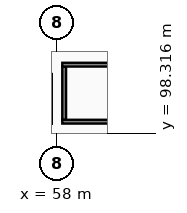
"""IFC4 building model, lengths in metres.
Left out: names, types, materials, properties, quantities, classifications, styles, units other than length and angle.
Written with IfcOpenShell. Run it as: python <this file> out.ifc"""

import sys

from ifc_helpers import new_model, si_unit, direction, frame, frame_2d, origin, place, context, subcontext, project, spatial, rectangle, extrude, element, fill, save


model = new_model("IFC4")
c1 = context("Model", 3, precision=1e-05, world=origin(), true_north=direction((0.0, 1.0)))
c2 = subcontext(c1, "Body", "Model", "MODEL_VIEW")
j1 = project(units=[si_unit("LENGTHUNIT", "METRE"), si_unit("PLANEANGLEUNIT", "RADIAN")], contexts=[c1])
p1 = place(None, origin())
s1 = spatial("IfcSite", under=j1, at=p1, CompositionType="ELEMENT")
p2 = place(p1, origin())
s2 = spatial("IfcBuilding", under=s1, at=p2, CompositionType="ELEMENT")
p3 = place(p2, frame((0.0, 0.0, 21.6)))
s3 = spatial("IfcBuildingStorey", under=s2, at=p3, CompositionType="ELEMENT", Elevation=21.6)
p4 = place(p3, frame((58.475, 102.7, 0.0), z_axis=(0.0, 0.0, 1.0), x_axis=(0.0, -1.0, 0.0)))
e1 = element("IfcWall", 1, at=p4, inside=s3, PredefinedType="SHEAR", context=c2, shape_type="SweptSolid", body=[
    extrude(rectangle(XDim=3.5, YDim=0.25, at=frame_2d((1.75, 0.0))), origin(), (0.0, 0.0, 1.0), 3.6),
])
p5 = place(p4, frame((1.1, 0.0, -0.01)))
e2 = element("IfcOpeningElement", 2, at=p5, cuts=e1, PredefinedType="OPENING", context=c2, shape_type="SweptSolid", body=[
    extrude(rectangle(XDim=1.3, YDim=2.16, at=frame_2d((0.65, 1.08))), frame((0.0, 0.135, 0.0), z_axis=(0.0, -1.0, 0.0), x_axis=(1.0, 0.0, 0.0)), (0.0, 0.0, 1.0), 0.27),
])
for number, where, z_axis, x_axis in (
    (3, (58.35, 99.075, 0.0), (0.0, 0.0, 1.0), (1.0, 0.0, 0.0)),
    (4, (58.35, 102.825, 0.0), (0.0, 0.0, 1.0), (1.0, 0.0, 0.0)),
):
    element("IfcWall", number, at=place(p3, frame(where, z_axis=z_axis, x_axis=x_axis)), inside=s3, PredefinedType="SHEAR", context=c2, shape_type="SweptSolid", body=[
        extrude(rectangle(XDim=8.9, YDim=0.25, at=frame_2d((4.45, 0.0))), origin(), (0.0, 0.0, 1.0), 3.6),
    ])
p6 = place(p5, frame((1.3, 0.0, 0.01), z_axis=(0.0, 0.0, 1.0), x_axis=(-1.0, 0.0, 0.0)))
e5 = element("IfcDoor", 5, at=p6, inside=s3, OperationType="SINGLE_SWING_LEFT", PredefinedType="DOOR", context=c2, shape_type="SweptSolid", body=[
    extrude(rectangle(XDim=1.3, YDim=2.15, at=frame_2d((0.65, 1.075))), frame((0.0, 0.025, 0.0), z_axis=(0.0, -1.0, 0.0), x_axis=(1.0, 0.0, 0.0)), (0.0, 0.0, 1.0), 0.05),
])
fill(e2, e5)
save(model, sys.argv[1])
